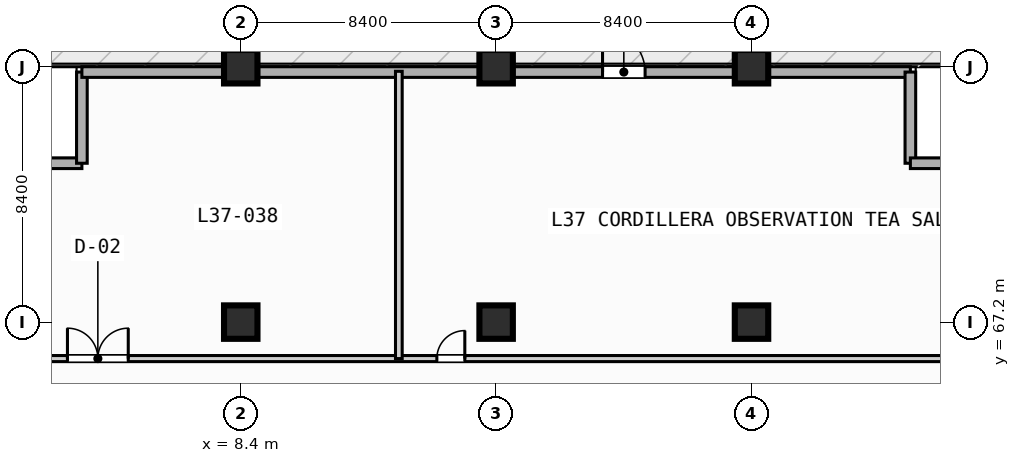
"""IFC4 building model, lengths in metres.
Left out: names, types, materials, properties, quantities, classifications, styles, units other than length and angle.
Written with IfcOpenShell. Run it as: python <this file> out.ifc"""

import sys

from ifc_helpers import new_model, si_unit, direction, frame, frame_2d, origin, origin_2d, place, context, subcontext, project, spatial, rectangle, extrude, element, fill, save


model = new_model("IFC4")
c1 = context("Model", 3, precision=1e-05, world=origin(), true_north=direction((0.0, 1.0)))
c2 = subcontext(c1, "Body", "Model", "MODEL_VIEW")
j1 = project(units=[si_unit("LENGTHUNIT", "METRE"), si_unit("PLANEANGLEUNIT", "RADIAN")], contexts=[c1])
p1 = place(None, origin())
s1 = spatial("IfcSite", under=j1, at=p1, CompositionType="ELEMENT")
p2 = place(p1, origin())
s2 = spatial("IfcBuilding", under=s1, at=p2, CompositionType="ELEMENT")
p3 = place(p2, frame((0.0, 0.0, 153.2)))
s3 = spatial("IfcBuildingStorey", under=s2, at=p3, CompositionType="ELEMENT", Elevation=153.2)
for number, where, z_axis, x_axis in (
    (1, (8.4, 67.2, 0.0), (0.0, 0.0, 1.0), (1.0, 0.0, 0.0)),
    (2, (8.4, 75.6, 0.0), (0.0, 0.0, 1.0), (1.0, 0.0, 0.0)),
    (3, (16.8, 67.2, 0.0), (0.0, 0.0, 1.0), (1.0, 0.0, 0.0)),
    (4, (16.8, 75.6, 0.0), (0.0, 0.0, 1.0), (1.0, 0.0, 0.0)),
    (5, (25.2, 67.2, 0.0), (0.0, 0.0, 1.0), (1.0, 0.0, 0.0)),
    (6, (25.2, 75.6, 0.0), (0.0, 0.0, 1.0), (1.0, 0.0, 0.0)),
):
    element("IfcColumn", number, at=place(p3, frame(where, z_axis=z_axis, x_axis=x_axis)), inside=s3, PredefinedType="COLUMN", context=c2, shape_type="SweptSolid", body=[
        extrude(rectangle(XDim=1.1, YDim=1.1, at=origin_2d()), origin(), (0.0, 0.0, 1.0), 4.4),
    ])
for number, where, z_axis, x_axis in (
    (7, (0.175, 72.425, 0.0), (0.0, 0.0, 1.0), (1.0, 0.0, 0.0)),
    (8, (3.175, 72.425, 0.0), (0.0, 0.0, 1.0), (0.0, 1.0, 0.0)),
):
    element("IfcWall", number, at=place(p3, frame(where, z_axis=z_axis, x_axis=x_axis)), inside=s3, PredefinedType="STANDARD", context=c2, shape_type="SweptSolid", body=[
        extrude(rectangle(XDim=3.0, YDim=0.35, at=frame_2d((1.5, 0.0))), origin(), (0.0, 0.0, 1.0), 4.15),
    ])
p4 = place(p3, frame((3.175, 75.425, 0.0), z_axis=(0.0, 0.0, 1.0), x_axis=(1.0, 0.0, 0.0)))
e9 = element("IfcWall", 9, at=p4, inside=s3, PredefinedType="STANDARD", context=c2, shape_type="SweptSolid", body=[
    extrude(rectangle(XDim=27.25, YDim=0.35, at=frame_2d((13.625, 0.0))), origin(), (0.0, 0.0, 1.0), 4.15),
])
p5 = place(p4, frame((17.125, 0.0, 0.0)))
e10 = element("IfcOpeningElement", 10, at=p5, cuts=e9, PredefinedType="OPENING", context=c2, shape_type="SweptSolid", body=[
    extrude(rectangle(XDim=1.4, YDim=2.2, at=frame_2d((0.7, 1.1))), frame((0.0, 0.185, 0.0), z_axis=(0.0, -1.0, 0.0), x_axis=(1.0, 0.0, 0.0)), (0.0, 0.0, 1.0), 0.37),
])
for number, where, z_axis, x_axis in (
    (11, (30.425, 75.425, 0.0), (0.0, 0.0, 1.0), (0.0, -1.0, 0.0)),
    (12, (30.425, 72.425, 0.0), (0.0, 0.0, 1.0), (1.0, 0.0, 0.0)),
):
    element("IfcWall", number, at=place(p3, frame(where, z_axis=z_axis, x_axis=x_axis)), inside=s3, PredefinedType="STANDARD", context=c2, shape_type="SweptSolid", body=[
        extrude(rectangle(XDim=3.0, YDim=0.35, at=frame_2d((1.5, 0.0))), origin(), (0.0, 0.0, 1.0), 4.15),
    ])
p6 = place(p3, frame((0.3, 66.0, 0.0), z_axis=(0.0, 0.0, 1.0), x_axis=(1.0, 0.0, 0.0)))
e13 = element("IfcWall", 13, at=p6, inside=s3, PredefinedType="PARTITIONING", context=c2, shape_type="SweptSolid", body=[
    extrude(rectangle(XDim=33.0, YDim=0.2, at=frame_2d((16.5, 0.0))), origin(), (0.0, 0.0, 1.0), 4.15),
])
p7 = place(p6, frame((2.4, 0.0, 0.0)))
e14 = element("IfcOpeningElement", 14, at=p7, cuts=e13, PredefinedType="OPENING", context=c2, shape_type="SweptSolid", body=[
    extrude(rectangle(XDim=2.0, YDim=2.15, at=frame_2d((1.0, 1.075))), frame((0.0, 0.11, 0.0), z_axis=(0.0, -1.0, 0.0), x_axis=(1.0, 0.0, 0.0)), (0.0, 0.0, 1.0), 0.22),
])
p8 = place(p6, frame((14.55, 0.0, 0.0)))
e15 = element("IfcOpeningElement", 15, at=p8, cuts=e13, PredefinedType="OPENING", context=c2, shape_type="SweptSolid", body=[
    extrude(rectangle(XDim=0.92, YDim=2.1, at=frame_2d((0.46, 1.05))), frame((0.0, 0.11, 0.0), z_axis=(0.0, -1.0, 0.0), x_axis=(1.0, 0.0, 0.0)), (0.0, 0.0, 1.0), 0.22),
])
p9 = place(p3, frame((13.6, 66.0, 0.0), z_axis=(0.0, 0.0, 1.0), x_axis=(0.0, 1.0, 0.0)))
e16 = element("IfcWall", 16, at=p9, inside=s3, PredefinedType="PARTITIONING", context=c2, shape_type="SweptSolid", body=[
    extrude(rectangle(XDim=9.45, YDim=0.22, at=frame_2d((4.725, 0.0))), origin(), (0.0, 0.0, 1.0), 4.15),
])
p10 = place(p5, origin())
e17 = element("IfcDoor", 17, at=p10, inside=s3, OperationType="SINGLE_SWING_LEFT", PredefinedType="DOOR", context=c2, shape_type="SweptSolid", body=[
    extrude(rectangle(XDim=1.4, YDim=2.2, at=frame_2d((0.7, 1.1))), frame((0.0, 0.025, 0.0), z_axis=(0.0, -1.0, 0.0), x_axis=(1.0, 0.0, 0.0)), (0.0, 0.0, 1.0), 0.05),
])
fill(e10, e17)
p11 = place(p7, origin())
e18 = element("IfcDoor", 18, at=p11, inside=s3, OperationType="SINGLE_SWING_LEFT", PredefinedType="DOOR", context=c2, shape_type="SweptSolid", body=[
    extrude(rectangle(XDim=2.0, YDim=2.15, at=frame_2d((1.0, 1.075))), frame((0.0, 0.025, 0.0), z_axis=(0.0, -1.0, 0.0), x_axis=(1.0, 0.0, 0.0)), (0.0, 0.0, 1.0), 0.05),
])
fill(e14, e18)
p12 = place(p8, origin())
e19 = element("IfcDoor", 19, at=p12, inside=s3, OperationType="SINGLE_SWING_RIGHT", PredefinedType="DOOR", context=c2, shape_type="SweptSolid", body=[
    extrude(rectangle(XDim=0.92, YDim=2.1, at=frame_2d((0.46, 1.05))), frame((0.0, 0.025, 0.0), z_axis=(0.0, -1.0, 0.0), x_axis=(1.0, 0.0, 0.0)), (0.0, 0.0, 1.0), 0.05),
])
fill(e15, e19)
save(model, sys.argv[1])
